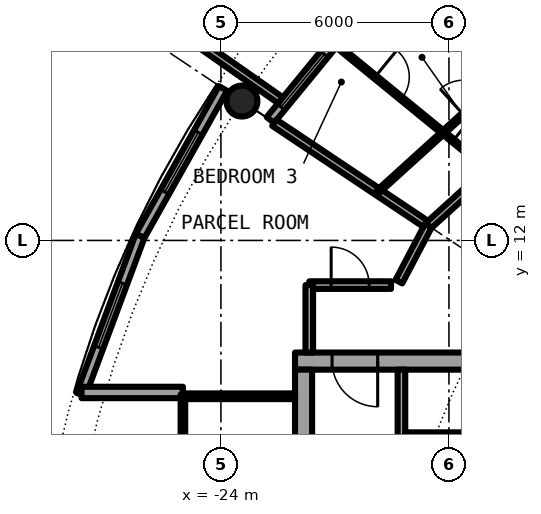
"""IFC4 building model, lengths in metres.
Left out: names, types, materials, properties, quantities, classifications, styles, units other than length and angle.
Written with IfcOpenShell. Run it as: python <this file> out.ifc"""

import sys

from ifc_helpers import new_model, si_unit, direction, frame, frame_2d, origin, origin_2d, place, context, subcontext, project, spatial, rectangle, hollow_circle, extrude, element, fill, save


model = new_model("IFC4")
c1 = context("Model", 3, precision=1e-05, world=origin(), true_north=direction((0.0, 1.0)))
c2 = subcontext(c1, "Body", "Model", "MODEL_VIEW")
j1 = project(units=[si_unit("LENGTHUNIT", "METRE"), si_unit("PLANEANGLEUNIT", "RADIAN")], contexts=[c1])
p1 = place(None, origin())
s1 = spatial("IfcSite", under=j1, at=p1, CompositionType="ELEMENT")
p2 = place(p1, origin())
s2 = spatial("IfcBuilding", under=s1, at=p2, CompositionType="ELEMENT")
p3 = place(p2, frame((0.0, 0.0, 212.7)))
s3 = spatial("IfcBuildingStorey", under=s2, at=p3, CompositionType="ELEMENT", Elevation=212.7)
p4 = place(p3, frame((-23.448, 15.667, 0.0), z_axis=(0.0, 0.0, 1.0), x_axis=(1.0, 0.0, 0.0)))
e1 = element("IfcColumn", 1, at=p4, inside=s3, PredefinedType="COLUMN", context=c2, shape_type="SweptSolid", body=[
    extrude(hollow_circle(Radius=0.406, WallThickness=0.03, at=origin_2d()), origin(), (0.0, 0.0, 1.0), 3.05),
])
p5 = place(p3, frame((-19.304, 19.304, 0.0), z_axis=(0.0, 0.0, 1.0), x_axis=(-0.634382322723, -0.773019449054, 0.0)))
e2 = element("IfcWall", 2, at=p5, inside=s3, PredefinedType="SOLIDWALL", context=c2, shape_type="SweptSolid", body=[
    extrude(rectangle(XDim=5.352, YDim=0.25, at=frame_2d((2.676, 0.0))), origin(), (0.0, 0.0, 1.0), 2.7),
])
p6 = place(p5, frame((0.841, 0.0, 0.0)))
e3 = element("IfcOpeningElement", 3, at=p6, cuts=e2, PredefinedType="OPENING", context=c2, shape_type="SweptSolid", body=[
    extrude(rectangle(XDim=1.0, YDim=2.2, at=frame_2d((0.5, 1.1))), frame((0.0, 0.135, 0.0), z_axis=(0.0, -1.0, 0.0), x_axis=(1.0, 0.0, 0.0)), (0.0, 0.0, 1.0), 0.27),
])
p7 = place(p5, frame((3.111, 0.0, 0.3)))
e4 = element("IfcOpeningElement", 4, at=p7, cuts=e2, PredefinedType="OPENING", context=c2, shape_type="SweptSolid", body=[
    extrude(rectangle(XDim=1.8, YDim=2.1, at=frame_2d((0.9, 1.05))), frame((0.0, 0.135, 0.0), z_axis=(0.0, -1.0, 0.0), x_axis=(1.0, 0.0, 0.0)), (0.0, 0.0, 1.0), 0.27),
])
p8 = place(p3, frame((-22.433, 15.688, -0.03), z_axis=(0.0, 0.0, 1.0), x_axis=(-0.819373043115, 0.573260687834, 0.0)))
e5 = element("IfcWall", 5, at=p8, inside=s3, PredefinedType="SOLIDWALL", context=c2, shape_type="SweptSolid", body=[
    extrude(rectangle(XDim=2.925, YDim=0.2, at=frame_2d((1.463, 0.0))), origin(), (0.0, 0.0, 1.0), 2.73),
])
p9 = place(p3, frame((-23.946, 16.0, 0.0), z_axis=(0.0, 0.0, 1.0), x_axis=(-0.489696356642, -0.871893042919, 0.0)))
e6 = element("IfcWall", 6, at=p9, inside=s3, PredefinedType="SOLIDWALL", context=c2, shape_type="SweptSolid", body=[
    extrude(rectangle(XDim=4.454, YDim=0.25, at=frame_2d((2.227, 0.0))), origin(), (0.0, 0.0, 1.0), 2.7),
])
p10 = place(p9, frame((1.327, 0.0, 0.3)))
e7 = element("IfcOpeningElement", 7, at=p10, cuts=e6, PredefinedType="OPENING", context=c2, shape_type="SweptSolid", body=[
    extrude(rectangle(XDim=1.8, YDim=2.1, at=frame_2d((0.9, 1.05))), frame((0.0, 0.135, 0.0), z_axis=(0.0, -1.0, 0.0), x_axis=(1.0, 0.0, 0.0)), (0.0, 0.0, 1.0), 0.27),
])
p11 = place(p3, frame((-26.127, 12.117, 0.0), z_axis=(0.0, 0.0, 1.0), x_axis=(-0.349247811493, -0.937030397675, 0.0)))
e8 = element("IfcWall", 8, at=p11, inside=s3, PredefinedType="SOLIDWALL", context=c2, shape_type="SweptSolid", body=[
    extrude(rectangle(XDim=4.452, YDim=0.25, at=frame_2d((2.226, 0.0))), origin(), (0.0, 0.0, 1.0), 2.7),
])
p12 = place(p11, frame((1.327, 0.0, 0.3)))
e9 = element("IfcOpeningElement", 9, at=p12, cuts=e8, PredefinedType="OPENING", context=c2, shape_type="SweptSolid", body=[
    extrude(rectangle(XDim=1.8, YDim=2.1, at=frame_2d((0.9, 1.05))), frame((0.0, 0.135, 0.0), z_axis=(0.0, -1.0, 0.0), x_axis=(1.0, 0.0, 0.0)), (0.0, 0.0, 1.0), 0.27),
])
p13 = place(p3, frame((-25.0, 8.0, 0.0), z_axis=(0.0, 0.0, 1.0), x_axis=(-1.0, 0.0, 0.0)))
e10 = element("IfcWall", 10, at=p13, inside=s3, PredefinedType="SOLIDWALL", context=c2, shape_type="SweptSolid", body=[
    extrude(rectangle(XDim=2.667, YDim=0.3, at=frame_2d((1.333, 0.0))), origin(), (0.0, 0.0, 1.0), 2.7),
])
p14 = place(p3, frame((-8.55, 8.825, 0.0), z_axis=(0.0, 0.0, 1.0), x_axis=(-1.0, 0.0, 0.0)))
e11 = element("IfcWall", 11, at=p14, inside=s3, PredefinedType="SHEAR", context=c2, shape_type="SweptSolid", body=[
    extrude(rectangle(XDim=13.5, YDim=0.45, at=frame_2d((6.75, 0.0))), origin(), (0.0, 0.0, 1.0), 3.05),
])
p15 = place(p14, frame((11.325, 0.0, 0.0)))
e12 = element("IfcOpeningElement", 12, at=p15, cuts=e11, PredefinedType="OPENING", context=c2, shape_type="SweptSolid", body=[
    extrude(rectangle(XDim=1.2, YDim=2.3, at=frame_2d((0.6, 1.15))), frame((0.0, 0.235, 0.0), z_axis=(0.0, -1.0, 0.0), x_axis=(1.0, 0.0, 0.0)), (0.0, 0.0, 1.0), 0.47),
])
p16 = place(p3, frame((-21.825, -8.6, 0.0), z_axis=(0.0, 0.0, 1.0), x_axis=(0.0, 1.0, 0.0)))
e13 = element("IfcWall", 13, at=p16, inside=s3, PredefinedType="SHEAR", context=c2, shape_type="SweptSolid", body=[
    extrude(rectangle(XDim=17.2, YDim=0.45, at=frame_2d((8.6, 0.0))), origin(), (0.0, 0.0, 1.0), 3.05),
])
p17 = place(p16, frame((7.7, 0.0, 0.0)))
e14 = element("IfcOpeningElement", 14, at=p17, cuts=e13, PredefinedType="OPENING", context=c2, shape_type="SweptSolid", body=[
    extrude(rectangle(XDim=1.8, YDim=2.3, at=frame_2d((0.9, 1.15))), frame((0.0, 0.235, 0.0), z_axis=(0.0, -1.0, 0.0), x_axis=(1.0, 0.0, 0.0)), (0.0, 0.0, 1.0), 0.47),
])
p18 = place(p3, frame((-19.25, 8.6, 0.0), z_axis=(0.0, 0.0, 1.0), x_axis=(0.0, -1.0, 0.0)))
e15 = element("IfcWall", 15, at=p18, inside=s3, PredefinedType="SOLIDWALL", context=c2, shape_type="SweptSolid", body=[
    extrude(rectangle(XDim=7.025, YDim=0.2, at=frame_2d((3.513, 0.0))), origin(), (0.0, 0.0, 1.0), 2.7),
])
p19 = place(p18, frame((2.35, 0.0, 0.0)))
e16 = element("IfcOpeningElement", 16, at=p19, cuts=e15, PredefinedType="OPENING", context=c2, shape_type="SweptSolid", body=[
    extrude(rectangle(XDim=1.1, YDim=2.3, at=frame_2d((0.55, 1.15))), frame((0.0, 0.11, 0.0), z_axis=(0.0, -1.0, 0.0), x_axis=(1.0, 0.0, 0.0)), (0.0, 0.0, 1.0), 0.22),
])
p20 = place(p3, frame((-15.45, 6.875, 0.0), z_axis=(0.0, 0.0, 1.0), x_axis=(-1.0, 0.0, 0.0)))
e17 = element("IfcWall", 17, at=p20, inside=s3, PredefinedType="PARTITIONING", context=c2, shape_type="SweptSolid", body=[
    extrude(rectangle(XDim=3.7, YDim=0.15, at=frame_2d((1.85, 0.0))), origin(), (0.0, 0.0, 1.0), 2.7),
])
p21 = place(p20, frame((1.4, 0.0, 0.0)))
e18 = element("IfcOpeningElement", 18, at=p21, cuts=e17, PredefinedType="OPENING", context=c2, shape_type="SweptSolid", body=[
    extrude(rectangle(XDim=0.9, YDim=2.3, at=frame_2d((0.45, 1.15))), frame((0.0, 0.085, 0.0), z_axis=(0.0, -1.0, 0.0), x_axis=(1.0, 0.0, 0.0)), (0.0, 0.0, 1.0), 0.17),
])
p22 = place(p3, frame((-22.05, 7.9, 0.0), z_axis=(0.0, 0.0, 1.0), x_axis=(-1.0, 0.0, 0.0)))
e19 = element("IfcWall", 19, at=p22, inside=s3, PredefinedType="PARTITIONING", context=c2, shape_type="SweptSolid", body=[
    extrude(rectangle(XDim=2.89, YDim=0.15, at=frame_2d((1.445, 0.0))), origin(), (0.0, 0.0, 1.0), 2.7),
])
p23 = place(p3, frame((-25.0, 7.95, 0.0), z_axis=(0.0, 0.0, 1.0), x_axis=(0.0, -1.0, 0.0)))
e20 = element("IfcWall", 20, at=p23, inside=s3, PredefinedType="PARTITIONING", context=c2, shape_type="SweptSolid", body=[
    extrude(rectangle(XDim=15.9, YDim=0.12, at=frame_2d((7.95, 0.0))), origin(), (0.0, 0.0, 1.0), 2.7),
])
p24 = place(p23, frame((0.95, 0.0, 0.1)))
e21 = element("IfcOpeningElement", 21, at=p24, cuts=e20, PredefinedType="OPENING", context=c2, shape_type="SweptSolid", body=[
    extrude(rectangle(XDim=14.0, YDim=2.35, at=frame_2d((7.0, 1.175))), frame((0.0, 0.07, 0.0), z_axis=(0.0, -1.0, 0.0), x_axis=(1.0, 0.0, 0.0)), (0.0, 0.0, 1.0), 0.14),
])
p25 = place(p3, frame((-22.595, 15.098, 0.0), z_axis=(0.0, 0.0, 1.0), x_axis=(0.831387096605, -0.55569370664, 0.0)))
e22 = element("IfcWall", 22, at=p25, inside=s3, PredefinedType="PARTITIONING", context=c2, shape_type="SweptSolid", body=[
    extrude(rectangle(XDim=4.875, YDim=0.2, at=frame_2d((2.438, 0.0))), origin(), (0.0, 0.0, 1.0), 2.7),
])
p26 = place(p3, frame((-21.04, 17.199, 0.0), z_axis=(0.0, 0.0, 1.0), x_axis=(0.774310172558, -0.632806255241, 0.0)))
e23 = element("IfcWall", 23, at=p26, inside=s3, PredefinedType="PARTITIONING", context=c2, shape_type="SweptSolid", body=[
    extrude(rectangle(XDim=5.3, YDim=0.1, at=frame_2d((2.65, 0.0))), origin(), (0.0, 0.0, 1.0), 2.7),
])
p27 = place(p26, frame((4.066, 0.0, 0.0)))
e24 = element("IfcOpeningElement", 24, at=p27, cuts=e23, PredefinedType="OPENING", context=c2, shape_type="SweptSolid", body=[
    extrude(rectangle(XDim=0.9, YDim=2.3, at=frame_2d((0.45, 1.15))), frame((0.0, 0.06, 0.0), z_axis=(0.0, -1.0, 0.0), x_axis=(1.0, 0.0, 0.0)), (0.0, 0.0, 1.0), 0.12),
])
p28 = place(p26, frame((1.416, 0.0, 0.0)))
e25 = element("IfcOpeningElement", 25, at=p28, cuts=e23, PredefinedType="OPENING", context=c2, shape_type="SweptSolid", body=[
    extrude(rectangle(XDim=0.9, YDim=2.3, at=frame_2d((0.45, 1.15))), frame((0.0, 0.06, 0.0), z_axis=(0.0, -1.0, 0.0), x_axis=(1.0, 0.0, 0.0)), (0.0, 0.0, 1.0), 0.12),
])
p29 = place(p3, frame((-19.234, 19.197, 0.0), z_axis=(0.0, 0.0, 1.0), x_axis=(0.707722727509, -0.706490297858, 0.0)))
e26 = element("IfcWall", 26, at=p29, inside=s3, PredefinedType="PARTITIONING", context=c2, shape_type="SweptSolid", body=[
    extrude(rectangle(XDim=3.962, YDim=0.1, at=frame_2d((1.981, 0.0))), origin(), (0.0, 0.0, 1.0), 2.7),
])
p30 = place(p3, frame((-21.675, 10.825, 0.0), z_axis=(0.0, 0.0, 1.0), x_axis=(1.0, 0.0, 0.0)))
e27 = element("IfcWall", 27, at=p30, inside=s3, PredefinedType="PARTITIONING", context=c2, shape_type="SweptSolid", body=[
    extrude(rectangle(XDim=2.152, YDim=0.2, at=frame_2d((1.076, 0.0))), origin(), (0.0, 0.0, 1.0), 2.7),
])
p31 = place(p30, frame((0.576, 0.0, 0.0)))
e28 = element("IfcOpeningElement", 28, at=p31, cuts=e27, PredefinedType="OPENING", context=c2, shape_type="SweptSolid", body=[
    extrude(rectangle(XDim=1.0, YDim=2.3, at=frame_2d((0.5, 1.15))), frame((0.0, 0.11, 0.0), z_axis=(0.0, -1.0, 0.0), x_axis=(1.0, 0.0, 0.0)), (0.0, 0.0, 1.0), 0.22),
])
p32 = place(p3, frame((-18.543, 12.386, 0.0), z_axis=(0.0, 0.0, 1.0), x_axis=(0.740853508928, 0.671666642248, 0.0)))
e29 = element("IfcWall", 29, at=p32, inside=s3, PredefinedType="PARTITIONING", context=c2, shape_type="SweptSolid", body=[
    extrude(rectangle(XDim=10.84, YDim=0.2, at=frame_2d((5.42, 0.0))), origin(), (0.0, 0.0, 1.0), 2.7),
])
p33 = place(p32, frame((4.921, 0.0, 0.0)))
e30 = element("IfcOpeningElement", 30, at=p33, cuts=e29, PredefinedType="OPENING", context=c2, shape_type="SweptSolid", body=[
    extrude(rectangle(XDim=1.0, YDim=2.3, at=frame_2d((0.5, 1.15))), frame((0.0, 0.11, 0.0), z_axis=(0.0, -1.0, 0.0), x_axis=(1.0, 0.0, 0.0)), (0.0, 0.0, 1.0), 0.22),
])
p34 = place(p3, frame((-21.675, 9.05, 0.0), z_axis=(0.0, 0.0, 1.0), x_axis=(0.0, 1.0, 0.0)))
e31 = element("IfcWall", 31, at=p34, inside=s3, PredefinedType="PARTITIONING", context=c2, shape_type="SweptSolid", body=[
    extrude(rectangle(XDim=1.775, YDim=0.2, at=frame_2d((0.887, 0.0))), origin(), (0.0, 0.0, 1.0), 2.7),
])
p35 = place(p3, frame((-19.317, 10.915, 0.0), z_axis=(0.0, 0.0, 1.0), x_axis=(0.465359652486, 0.885121683068, 0.0)))
e32 = element("IfcWall", 32, at=p35, inside=s3, PredefinedType="PARTITIONING", context=c2, shape_type="SweptSolid", body=[
    extrude(rectangle(XDim=1.665, YDim=0.2, at=frame_2d((0.833, 0.0))), origin(), (0.0, 0.0, 1.0), 2.7),
])
p36 = place(p3, frame((-19.872, 13.278, 0.0), z_axis=(0.0, 0.0, 1.0), x_axis=(0.740923753351, 0.671589153962, 0.0)))
e33 = element("IfcWall", 33, at=p36, inside=s3, PredefinedType="PARTITIONING", context=c2, shape_type="SweptSolid", body=[
    extrude(rectangle(XDim=6.969, YDim=0.1, at=frame_2d((3.484, 0.0))), origin(), (0.0, 0.0, 1.0), 2.7),
])
p37 = place(p36, frame((3.034, 0.0, 0.0)))
e34 = element("IfcOpeningElement", 34, at=p37, cuts=e33, PredefinedType="OPENING", context=c2, shape_type="SweptSolid", body=[
    extrude(rectangle(XDim=0.9, YDim=2.3, at=frame_2d((0.45, 1.15))), frame((0.0, 0.06, 0.0), z_axis=(0.0, -1.0, 0.0), x_axis=(1.0, 0.0, 0.0)), (0.0, 0.0, 1.0), 0.12),
])
p38 = place(p7, origin())
e35 = element("IfcWindow", 35, at=p38, inside=s3, PartitioningType="SINGLE_PANEL", PredefinedType="WINDOW", context=c2, shape_type="SweptSolid", body=[
    extrude(rectangle(XDim=1.8, YDim=2.1, at=frame_2d((0.9, 1.05))), frame((0.0, 0.03, 0.0), z_axis=(0.0, -1.0, 0.0), x_axis=(1.0, 0.0, 0.0)), (0.0, 0.0, 1.0), 0.06),
])
fill(e4, e35)
p39 = place(p10, origin())
e36 = element("IfcWindow", 36, at=p39, inside=s3, PartitioningType="SINGLE_PANEL", PredefinedType="WINDOW", context=c2, shape_type="SweptSolid", body=[
    extrude(rectangle(XDim=1.8, YDim=2.1, at=frame_2d((0.9, 1.05))), frame((0.0, 0.03, 0.0), z_axis=(0.0, -1.0, 0.0), x_axis=(1.0, 0.0, 0.0)), (0.0, 0.0, 1.0), 0.06),
])
fill(e7, e36)
p40 = place(p12, origin())
e37 = element("IfcWindow", 37, at=p40, inside=s3, PartitioningType="SINGLE_PANEL", PredefinedType="WINDOW", context=c2, shape_type="SweptSolid", body=[
    extrude(rectangle(XDim=1.8, YDim=2.1, at=frame_2d((0.9, 1.05))), frame((0.0, 0.03, 0.0), z_axis=(0.0, -1.0, 0.0), x_axis=(1.0, 0.0, 0.0)), (0.0, 0.0, 1.0), 0.06),
])
fill(e9, e37)
p41 = place(p21, origin())
e38 = element("IfcDoor", 38, at=p41, inside=s3, OperationType="SINGLE_SWING_LEFT", PredefinedType="DOOR", context=c2, shape_type="SweptSolid", body=[
    extrude(rectangle(XDim=0.9, YDim=2.3, at=frame_2d((0.45, 1.15))), frame((0.0, 0.025, 0.0), z_axis=(0.0, -1.0, 0.0), x_axis=(1.0, 0.0, 0.0)), (0.0, 0.0, 1.0), 0.05),
])
fill(e18, e38)
p42 = place(p15, origin())
e39 = element("IfcDoor", 39, at=p42, inside=s3, OperationType="SINGLE_SWING_LEFT", PredefinedType="DOOR", context=c2, shape_type="SweptSolid", body=[
    extrude(rectangle(XDim=1.2, YDim=2.3, at=frame_2d((0.6, 1.15))), frame((0.0, 0.025, 0.0), z_axis=(0.0, -1.0, 0.0), x_axis=(1.0, 0.0, 0.0)), (0.0, 0.0, 1.0), 0.05),
])
fill(e12, e39)
p43 = place(p24, origin())
e40 = element("IfcWindow", 40, at=p43, inside=s3, PartitioningType="SINGLE_PANEL", PredefinedType="WINDOW", context=c2, shape_type="SweptSolid", body=[
    extrude(rectangle(XDim=14.0, YDim=2.35, at=frame_2d((7.0, 1.175))), frame((0.0, 0.03, 0.0), z_axis=(0.0, -1.0, 0.0), x_axis=(1.0, 0.0, 0.0)), (0.0, 0.0, 1.0), 0.06),
])
fill(e21, e40)
p44 = place(p27, origin())
e41 = element("IfcDoor", 41, at=p44, inside=s3, OperationType="SINGLE_SWING_RIGHT", PredefinedType="DOOR", context=c2, shape_type="SweptSolid", body=[
    extrude(rectangle(XDim=0.9, YDim=2.3, at=frame_2d((0.45, 1.15))), frame((0.0, 0.025, 0.0), z_axis=(0.0, -1.0, 0.0), x_axis=(1.0, 0.0, 0.0)), (0.0, 0.0, 1.0), 0.05),
])
fill(e24, e41)
p45 = place(p28, origin())
e42 = element("IfcDoor", 42, at=p45, inside=s3, OperationType="SINGLE_SWING_LEFT", PredefinedType="DOOR", context=c2, shape_type="SweptSolid", body=[
    extrude(rectangle(XDim=0.9, YDim=2.3, at=frame_2d((0.45, 1.15))), frame((0.0, 0.025, 0.0), z_axis=(0.0, -1.0, 0.0), x_axis=(1.0, 0.0, 0.0)), (0.0, 0.0, 1.0), 0.05),
])
fill(e25, e42)
p46 = place(p31, origin())
e43 = element("IfcDoor", 43, at=p46, inside=s3, OperationType="SINGLE_SWING_LEFT", PredefinedType="DOOR", context=c2, shape_type="SweptSolid", body=[
    extrude(rectangle(XDim=1.0, YDim=2.3, at=frame_2d((0.5, 1.15))), frame((0.0, 0.025, 0.0), z_axis=(0.0, -1.0, 0.0), x_axis=(1.0, 0.0, 0.0)), (0.0, 0.0, 1.0), 0.05),
])
fill(e28, e43)
save(model, sys.argv[1])
